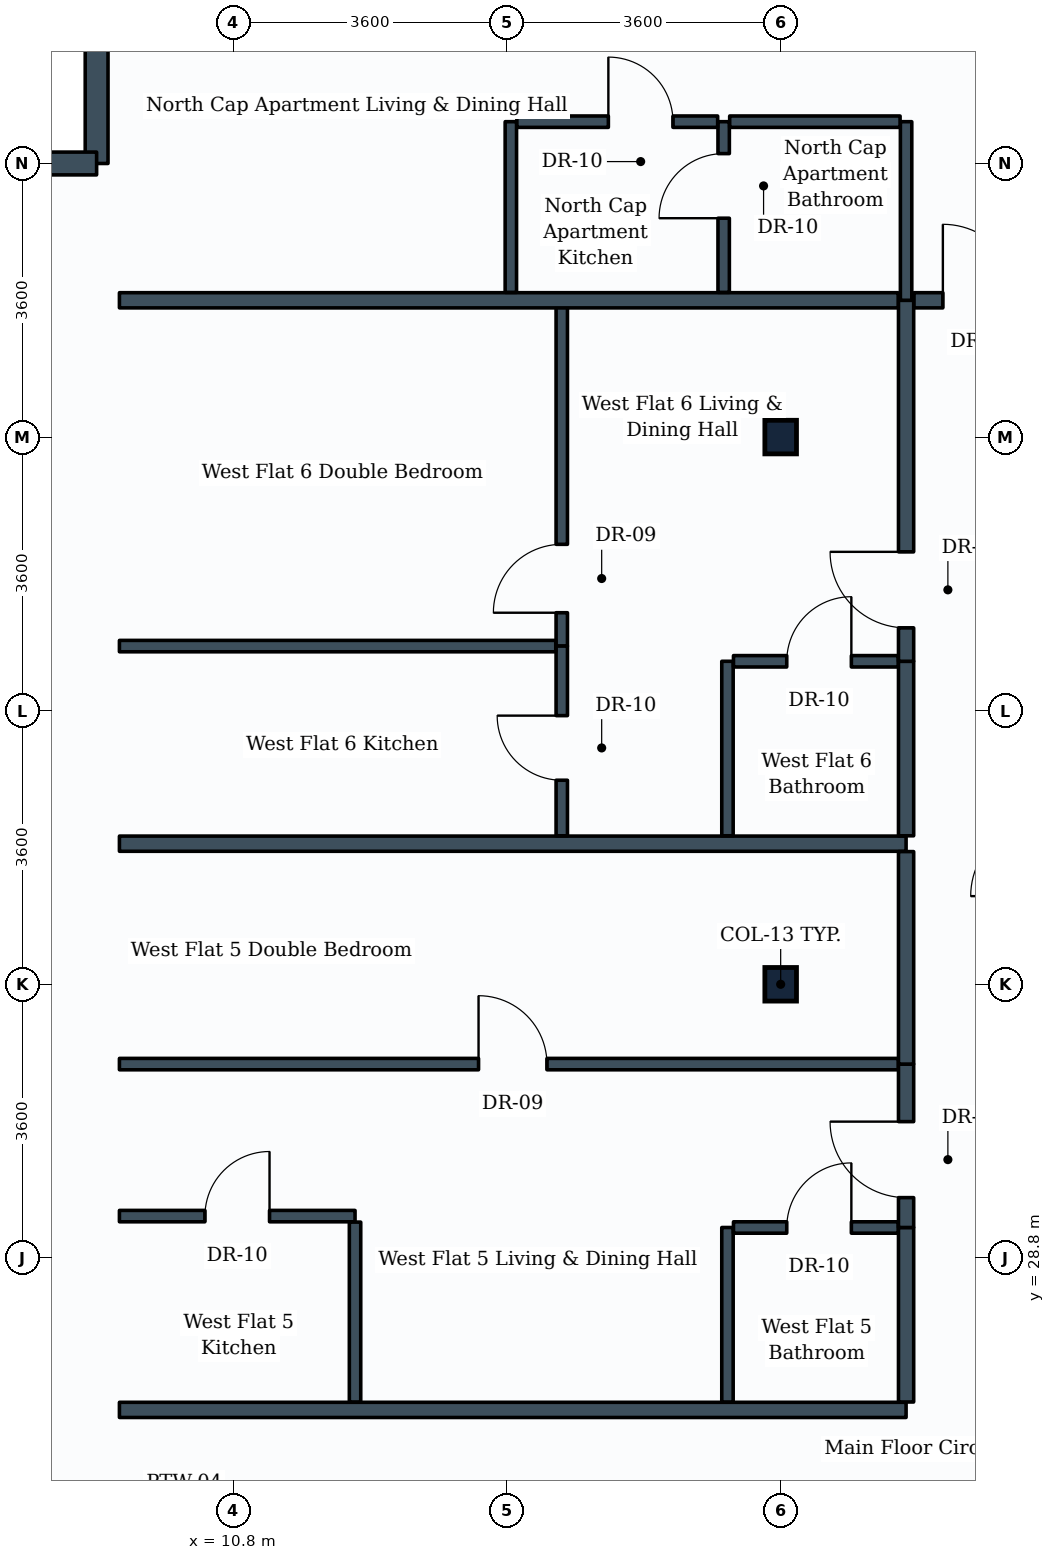
"""IFC4 building model, lengths in metres.
Left out: names, types, materials, properties, quantities, classifications, styles, units other than length and angle.
Written with IfcOpenShell. Run it as: python <this file> out.ifc"""

import sys

from ifc_helpers import new_model, si_unit, direction, frame, frame_2d, origin, origin_2d, place, context, subcontext, project, spatial, rectangle, i_section, extrude, element, fill, save


model = new_model("IFC4")
c1 = context("Model", 3, precision=1e-05, world=origin(), true_north=direction((0.0, 1.0)))
c2 = subcontext(c1, "Body", "Model", "MODEL_VIEW")
j1 = project(units=[si_unit("LENGTHUNIT", "METRE"), si_unit("PLANEANGLEUNIT", "RADIAN")], contexts=[c1])
p1 = place(None, origin())
s1 = spatial("IfcSite", under=j1, at=p1, CompositionType="ELEMENT")
p2 = place(p1, origin())
s2 = spatial("IfcBuilding", under=s1, at=p2, CompositionType="ELEMENT")
p3 = place(p2, frame((0.0, 0.0, 123.8)))
s3 = spatial("IfcBuildingStorey", under=s2, at=p3, CompositionType="ELEMENT", Elevation=123.8)
for number, where, z_axis, x_axis in (
    (1, (18.0, 32.4, 0.0), (0.0, 0.0, 1.0), (1.0, 0.0, 0.0)),
    (2, (18.0, 39.6, 0.0), (0.0, 0.0, 1.0), (1.0, 0.0, 0.0)),
):
    element("IfcColumn", number, at=place(p3, frame(where, z_axis=z_axis, x_axis=x_axis)), inside=s3, PredefinedType="COLUMN", context=c2, shape_type="SweptSolid", body=[
        extrude(i_section(OverallWidth=0.416, OverallDepth=0.442, WebThickness=0.025, FlangeThickness=0.041, FilletRadius=0.015, at=origin_2d()), origin(), (0.0, 0.0, 1.0), 3.8),
    ])
for number, where, z_axis, x_axis in (
    (3, (9.0, 43.2, 0.0), (0.0, 0.0, 1.0), (0.0, 1.0, 0.0)),
    (4, (7.2, 43.2, 0.0), (0.0, 0.0, 1.0), (1.0, 0.0, 0.0)),
):
    element("IfcWall", number, at=place(p3, frame(where, z_axis=z_axis, x_axis=x_axis)), inside=s3, PredefinedType="STANDARD", context=c2, shape_type="SweptSolid", body=[
        extrude(rectangle(XDim=1.8, YDim=0.3, at=frame_2d((0.9, 0.0))), origin(), (0.0, 0.0, 1.0), 2.43),
    ])
for number, where, z_axis, x_axis in (
    (5, (9.3, 26.8, 0.0), (0.0, 0.0, 1.0), (1.0, 0.0, 0.0)),
    (6, (9.3, 34.25, 0.0), (0.0, 0.0, 1.0), (1.0, 0.0, 0.0)),
):
    element("IfcWall", number, at=place(p3, frame(where, z_axis=z_axis, x_axis=x_axis)), inside=s3, PredefinedType="PARTITIONING", context=c2, shape_type="SweptSolid", body=[
        extrude(rectangle(XDim=10.35, YDim=0.2, at=frame_2d((5.175, 0.0))), origin(), (0.0, 0.0, 1.0), 2.43),
    ])
p4 = place(p3, frame((19.65, 26.904, 0.0), z_axis=(0.0, 0.0, 1.0), x_axis=(0.0, 1.0, 0.0)))
e7 = element("IfcWall", 7, at=p4, inside=s3, PredefinedType="PARTITIONING", context=c2, shape_type="SweptSolid", body=[
    extrude(rectangle(XDim=2.296, YDim=0.2, at=frame_2d((1.148, 0.0))), origin(), (0.0, 0.0, 1.0), 3.15),
])
p5 = place(p3, frame((17.3, 26.904, 0.0), z_axis=(0.0, 0.0, 1.0), x_axis=(0.0, 1.0, 0.0)))
e8 = element("IfcWall", 8, at=p5, inside=s3, PredefinedType="PARTITIONING", context=c2, shape_type="SweptSolid", body=[
    extrude(rectangle(XDim=2.296, YDim=0.15, at=frame_2d((1.148, 0.0))), origin(), (0.0, 0.0, 1.0), 3.15),
])
p6 = place(p3, frame((17.379, 29.2, 0.0), z_axis=(0.0, 0.0, 1.0), x_axis=(1.0, 0.0, 0.0)))
e9 = element("IfcWall", 9, at=p6, inside=s3, PredefinedType="PARTITIONING", context=c2, shape_type="SweptSolid", body=[
    extrude(rectangle(XDim=2.167, YDim=0.15, at=frame_2d((1.083, 0.0))), origin(), (0.0, 0.0, 1.0), 2.43),
])
p7 = place(p6, frame((0.701, 0.0, 0.0)))
e10 = element("IfcOpeningElement", 10, at=p7, cuts=e9, PredefinedType="OPENING", context=c2, shape_type="SweptSolid", body=[
    extrude(rectangle(XDim=0.85, YDim=2.1, at=frame_2d((0.425, 1.05))), frame((0.0, 0.085, 0.0), z_axis=(0.0, -1.0, 0.0), x_axis=(1.0, 0.0, 0.0)), (0.0, 0.0, 1.0), 0.17),
])
p8 = place(p3, frame((19.65, 29.2, 0.0), z_axis=(0.0, 0.0, 1.0), x_axis=(0.0, 1.0, 0.0)))
e11 = element("IfcWall", 11, at=p8, inside=s3, PredefinedType="PARTITIONING", context=c2, shape_type="SweptSolid", body=[
    extrude(rectangle(XDim=2.15, YDim=0.2, at=frame_2d((1.075, 0.0))), origin(), (0.0, 0.0, 1.0), 3.465),
])
p9 = place(p8, frame((0.393, 0.0, 0.0)))
e12 = element("IfcOpeningElement", 12, at=p9, cuts=e11, PredefinedType="OPENING", context=c2, shape_type="SweptSolid", body=[
    extrude(rectangle(XDim=1.0, YDim=2.1, at=frame_2d((0.5, 1.05))), frame((0.0, 0.11, 0.0), z_axis=(0.0, -1.0, 0.0), x_axis=(1.0, 0.0, 0.0)), (0.0, 0.0, 1.0), 0.22),
])
p10 = place(p3, frame((19.65, 31.35, 0.0), z_axis=(0.0, 0.0, 1.0), x_axis=(0.0, 1.0, 0.0)))
e13 = element("IfcWall", 13, at=p10, inside=s3, PredefinedType="PARTITIONING", context=c2, shape_type="SweptSolid", body=[
    extrude(rectangle(XDim=2.796, YDim=0.2, at=frame_2d((1.398, 0.0))), origin(), (0.0, 0.0, 1.0), 3.1),
])
p11 = place(p3, frame((9.3, 31.35, 0.0), z_axis=(0.0, 0.0, 1.0), x_axis=(1.0, 0.0, 0.0)))
e14 = element("IfcWall", 14, at=p11, inside=s3, PredefinedType="PARTITIONING", context=c2, shape_type="SweptSolid", body=[
    extrude(rectangle(XDim=10.246, YDim=0.15, at=frame_2d((5.123, 0.0))), origin(), (0.0, 0.0, 1.0), 2.43),
])
p12 = place(p11, frame((4.725, 0.0, 0.0)))
e15 = element("IfcOpeningElement", 15, at=p12, cuts=e14, PredefinedType="OPENING", context=c2, shape_type="SweptSolid", body=[
    extrude(rectangle(XDim=0.9, YDim=2.1, at=frame_2d((0.45, 1.05))), frame((0.0, 0.085, 0.0), z_axis=(0.0, -1.0, 0.0), x_axis=(1.0, 0.0, 0.0)), (0.0, 0.0, 1.0), 0.17),
])
p13 = place(p3, frame((9.3, 29.35, 0.0), z_axis=(0.0, 0.0, 1.0), x_axis=(1.0, 0.0, 0.0)))
e16 = element("IfcWall", 16, at=p13, inside=s3, PredefinedType="PARTITIONING", context=c2, shape_type="SweptSolid", body=[
    extrude(rectangle(XDim=3.1, YDim=0.15, at=frame_2d((1.55, 0.0))), origin(), (0.0, 0.0, 1.0), 3.01),
])
p14 = place(p13, frame((1.125, 0.0, 0.0)))
e17 = element("IfcOpeningElement", 17, at=p14, cuts=e16, PredefinedType="OPENING", context=c2, shape_type="SweptSolid", body=[
    extrude(rectangle(XDim=0.85, YDim=2.1, at=frame_2d((0.425, 1.05))), frame((0.0, 0.085, 0.0), z_axis=(0.0, -1.0, 0.0), x_axis=(1.0, 0.0, 0.0)), (0.0, 0.0, 1.0), 0.17),
])
p15 = place(p3, frame((12.4, 26.904, 0.0), z_axis=(0.0, 0.0, 1.0), x_axis=(0.0, 1.0, 0.0)))
e18 = element("IfcWall", 18, at=p15, inside=s3, PredefinedType="PARTITIONING", context=c2, shape_type="SweptSolid", body=[
    extrude(rectangle(XDim=2.367, YDim=0.15, at=frame_2d((1.184, 0.0))), origin(), (0.0, 0.0, 1.0), 3.15),
])
p16 = place(p3, frame((19.65, 34.354, 0.0), z_axis=(0.0, 0.0, 1.0), x_axis=(0.0, 1.0, 0.0)))
e19 = element("IfcWall", 19, at=p16, inside=s3, PredefinedType="PARTITIONING", context=c2, shape_type="SweptSolid", body=[
    extrude(rectangle(XDim=2.296, YDim=0.2, at=frame_2d((1.148, 0.0))), origin(), (0.0, 0.0, 1.0), 3.15),
])
p17 = place(p3, frame((17.3, 34.354, 0.0), z_axis=(0.0, 0.0, 1.0), x_axis=(0.0, 1.0, 0.0)))
e20 = element("IfcWall", 20, at=p17, inside=s3, PredefinedType="PARTITIONING", context=c2, shape_type="SweptSolid", body=[
    extrude(rectangle(XDim=2.296, YDim=0.15, at=frame_2d((1.148, 0.0))), origin(), (0.0, 0.0, 1.0), 3.15),
])
p18 = place(p3, frame((17.379, 36.65, 0.0), z_axis=(0.0, 0.0, 1.0), x_axis=(1.0, 0.0, 0.0)))
e21 = element("IfcWall", 21, at=p18, inside=s3, PredefinedType="PARTITIONING", context=c2, shape_type="SweptSolid", body=[
    extrude(rectangle(XDim=2.167, YDim=0.15, at=frame_2d((1.083, 0.0))), origin(), (0.0, 0.0, 1.0), 2.43),
])
p19 = place(p18, frame((0.701, 0.0, 0.0)))
e22 = element("IfcOpeningElement", 22, at=p19, cuts=e21, PredefinedType="OPENING", context=c2, shape_type="SweptSolid", body=[
    extrude(rectangle(XDim=0.85, YDim=2.1, at=frame_2d((0.425, 1.05))), frame((0.0, 0.085, 0.0), z_axis=(0.0, -1.0, 0.0), x_axis=(1.0, 0.0, 0.0)), (0.0, 0.0, 1.0), 0.17),
])
p20 = place(p3, frame((19.65, 36.65, 0.0), z_axis=(0.0, 0.0, 1.0), x_axis=(0.0, 1.0, 0.0)))
e23 = element("IfcWall", 23, at=p20, inside=s3, PredefinedType="PARTITIONING", context=c2, shape_type="SweptSolid", body=[
    extrude(rectangle(XDim=4.75, YDim=0.2, at=frame_2d((2.375, 0.0))), origin(), (0.0, 0.0, 1.0), 3.465),
])
p21 = place(p20, frame((0.44, 0.0, 0.0)))
e24 = element("IfcOpeningElement", 24, at=p21, cuts=e23, PredefinedType="OPENING", context=c2, shape_type="SweptSolid", body=[
    extrude(rectangle(XDim=1.0, YDim=2.1, at=frame_2d((0.5, 1.05))), frame((0.0, 0.11, 0.0), z_axis=(0.0, -1.0, 0.0), x_axis=(1.0, 0.0, 0.0)), (0.0, 0.0, 1.0), 0.22),
])
p22 = place(p3, frame((15.12, 36.85, 0.0), z_axis=(0.0, 0.0, 1.0), x_axis=(0.0, 1.0, 0.0)))
e25 = element("IfcWall", 25, at=p22, inside=s3, PredefinedType="PARTITIONING", context=c2, shape_type="SweptSolid", body=[
    extrude(rectangle(XDim=4.55, YDim=0.15, at=frame_2d((2.275, 0.0))), origin(), (0.0, 0.0, 1.0), 3.465),
])
p23 = place(p22, frame((0.439, 0.0, 0.0)))
e26 = element("IfcOpeningElement", 26, at=p23, cuts=e25, PredefinedType="OPENING", context=c2, shape_type="SweptSolid", body=[
    extrude(rectangle(XDim=0.9, YDim=2.1, at=frame_2d((0.45, 1.05))), frame((0.0, 0.085, 0.0), z_axis=(0.0, -1.0, 0.0), x_axis=(1.0, 0.0, 0.0)), (0.0, 0.0, 1.0), 0.17),
])
p24 = place(p3, frame((15.12, 34.354, 0.0), z_axis=(0.0, 0.0, 1.0), x_axis=(0.0, 1.0, 0.0)))
e27 = element("IfcWall", 27, at=p24, inside=s3, PredefinedType="PARTITIONING", context=c2, shape_type="SweptSolid", body=[
    extrude(rectangle(XDim=2.496, YDim=0.15, at=frame_2d((1.248, 0.0))), origin(), (0.0, 0.0, 1.0), 3.15),
])
p25 = place(p24, frame((0.731, 0.0, 0.0)))
e28 = element("IfcOpeningElement", 28, at=p25, cuts=e27, PredefinedType="OPENING", context=c2, shape_type="SweptSolid", body=[
    extrude(rectangle(XDim=0.85, YDim=2.1, at=frame_2d((0.425, 1.05))), frame((0.0, 0.085, 0.0), z_axis=(0.0, -1.0, 0.0), x_axis=(1.0, 0.0, 0.0)), (0.0, 0.0, 1.0), 0.17),
])
p26 = place(p3, frame((9.3, 36.85, 0.0), z_axis=(0.0, 0.0, 1.0), x_axis=(1.0, 0.0, 0.0)))
e29 = element("IfcWall", 29, at=p26, inside=s3, PredefinedType="PARTITIONING", context=c2, shape_type="SweptSolid", body=[
    extrude(rectangle(XDim=5.741, YDim=0.15, at=frame_2d((2.871, 0.0))), origin(), (0.0, 0.0, 1.0), 3.465),
])
p27 = place(p3, frame((9.3, 41.4, 0.0), z_axis=(0.0, 0.0, 1.0), x_axis=(1.0, 0.0, 0.0)))
e30 = element("IfcWall", 30, at=p27, inside=s3, PredefinedType="PARTITIONING", context=c2, shape_type="SweptSolid", body=[
    extrude(rectangle(XDim=10.246, YDim=0.2, at=frame_2d((5.123, 0.0))), origin(), (0.0, 0.0, 1.0), 2.43),
])
p28 = place(p3, frame((19.754, 41.4, 0.0), z_axis=(0.0, 0.0, 1.0), x_axis=(1.0, 0.0, 0.0)))
e31 = element("IfcWall", 31, at=p28, inside=s3, PredefinedType="PARTITIONING", context=c2, shape_type="SweptSolid", body=[
    extrude(rectangle(XDim=1.667, YDim=0.2, at=frame_2d((0.833, 0.0))), origin(), (0.0, 0.0, 1.0), 3.465),
])
p29 = place(p28, frame((0.38, 0.0, 0.0)))
e32 = element("IfcOpeningElement", 32, at=p29, cuts=e31, PredefinedType="OPENING", context=c2, shape_type="SweptSolid", body=[
    extrude(rectangle(XDim=1.0, YDim=2.1, at=frame_2d((0.5, 1.05))), frame((0.0, 0.11, 0.0), z_axis=(0.0, -1.0, 0.0), x_axis=(1.0, 0.0, 0.0)), (0.0, 0.0, 1.0), 0.22),
])
p30 = place(p3, frame((19.65, 41.4, 0.0), z_axis=(0.0, 0.0, 1.0), x_axis=(0.0, 1.0, 0.0)))
e33 = element("IfcWall", 33, at=p30, inside=s3, PredefinedType="PARTITIONING", context=c2, shape_type="SweptSolid", body=[
    extrude(rectangle(XDim=2.35, YDim=0.15, at=frame_2d((1.175, 0.0))), origin(), (0.0, 0.0, 1.0), 2.43),
])
p31 = place(p3, frame((17.25, 41.504, 0.0), z_axis=(0.0, 0.0, 1.0), x_axis=(0.0, 1.0, 0.0)))
e34 = element("IfcWall", 34, at=p31, inside=s3, PredefinedType="PARTITIONING", context=c2, shape_type="SweptSolid", body=[
    extrude(rectangle(XDim=2.246, YDim=0.15, at=frame_2d((1.123, 0.0))), origin(), (0.0, 0.0, 1.0), 2.43),
])
p32 = place(p31, frame((0.976, 0.0, 0.0)))
e35 = element("IfcOpeningElement", 35, at=p32, cuts=e34, PredefinedType="OPENING", context=c2, shape_type="SweptSolid", body=[
    extrude(rectangle(XDim=0.85, YDim=2.1, at=frame_2d((0.425, 1.05))), frame((0.0, 0.085, 0.0), z_axis=(0.0, -1.0, 0.0), x_axis=(1.0, 0.0, 0.0)), (0.0, 0.0, 1.0), 0.17),
])
p33 = place(p3, frame((17.329, 43.75, 0.0), z_axis=(0.0, 0.0, 1.0), x_axis=(1.0, 0.0, 0.0)))
e36 = element("IfcWall", 36, at=p33, inside=s3, PredefinedType="PARTITIONING", context=c2, shape_type="SweptSolid", body=[
    extrude(rectangle(XDim=2.242, YDim=0.15, at=frame_2d((1.121, 0.0))), origin(), (0.0, 0.0, 1.0), 2.43),
])
p34 = place(p3, frame((14.45, 41.504, 0.0), z_axis=(0.0, 0.0, 1.0), x_axis=(0.0, 1.0, 0.0)))
e37 = element("IfcWall", 37, at=p34, inside=s3, PredefinedType="PARTITIONING", context=c2, shape_type="SweptSolid", body=[
    extrude(rectangle(XDim=2.246, YDim=0.15, at=frame_2d((1.123, 0.0))), origin(), (0.0, 0.0, 1.0), 2.43),
])
p35 = place(p3, frame((14.529, 43.75, 0.0), z_axis=(0.0, 0.0, 1.0), x_axis=(1.0, 0.0, 0.0)))
e38 = element("IfcWall", 38, at=p35, inside=s3, PredefinedType="PARTITIONING", context=c2, shape_type="SweptSolid", body=[
    extrude(rectangle(XDim=2.642, YDim=0.15, at=frame_2d((1.321, 0.0))), origin(), (0.0, 0.0, 1.0), 2.43),
])
p36 = place(p35, frame((1.204, 0.0, 0.0)))
e39 = element("IfcOpeningElement", 39, at=p36, cuts=e38, PredefinedType="OPENING", context=c2, shape_type="SweptSolid", body=[
    extrude(rectangle(XDim=0.85, YDim=2.1, at=frame_2d((0.425, 1.05))), frame((0.0, 0.085, 0.0), z_axis=(0.0, -1.0, 0.0), x_axis=(1.0, 0.0, 0.0)), (0.0, 0.0, 1.0), 0.17),
])
p37 = place(p7, origin())
e40 = element("IfcDoor", 40, at=p37, inside=s3, OperationType="SINGLE_SWING_RIGHT", PredefinedType="DOOR", context=c2, shape_type="SweptSolid", body=[
    extrude(rectangle(XDim=0.85, YDim=2.1, at=frame_2d((0.425, 1.05))), frame((0.0, 0.025, 0.0), z_axis=(0.0, -1.0, 0.0), x_axis=(1.0, 0.0, 0.0)), (0.0, 0.0, 1.0), 0.05),
])
fill(e10, e40)
p38 = place(p9, origin())
e41 = element("IfcDoor", 41, at=p38, inside=s3, OperationType="SINGLE_SWING_RIGHT", PredefinedType="DOOR", context=c2, shape_type="SweptSolid", body=[
    extrude(rectangle(XDim=1.0, YDim=2.1, at=frame_2d((0.5, 1.05))), frame((0.0, 0.025, 0.0), z_axis=(0.0, -1.0, 0.0), x_axis=(1.0, 0.0, 0.0)), (0.0, 0.0, 1.0), 0.05),
])
fill(e12, e41)
p39 = place(p12, origin())
e42 = element("IfcDoor", 42, at=p39, inside=s3, OperationType="SINGLE_SWING_LEFT", PredefinedType="DOOR", context=c2, shape_type="SweptSolid", body=[
    extrude(rectangle(XDim=0.9, YDim=2.1, at=frame_2d((0.45, 1.05))), frame((0.0, 0.025, 0.0), z_axis=(0.0, -1.0, 0.0), x_axis=(1.0, 0.0, 0.0)), (0.0, 0.0, 1.0), 0.05),
])
fill(e15, e42)
p40 = place(p14, origin())
e43 = element("IfcDoor", 43, at=p40, inside=s3, OperationType="SINGLE_SWING_RIGHT", PredefinedType="DOOR", context=c2, shape_type="SweptSolid", body=[
    extrude(rectangle(XDim=0.85, YDim=2.1, at=frame_2d((0.425, 1.05))), frame((0.0, 0.025, 0.0), z_axis=(0.0, -1.0, 0.0), x_axis=(1.0, 0.0, 0.0)), (0.0, 0.0, 1.0), 0.05),
])
fill(e17, e43)
p41 = place(p19, origin())
e44 = element("IfcDoor", 44, at=p41, inside=s3, OperationType="SINGLE_SWING_RIGHT", PredefinedType="DOOR", context=c2, shape_type="SweptSolid", body=[
    extrude(rectangle(XDim=0.85, YDim=2.1, at=frame_2d((0.425, 1.05))), frame((0.0, 0.025, 0.0), z_axis=(0.0, -1.0, 0.0), x_axis=(1.0, 0.0, 0.0)), (0.0, 0.0, 1.0), 0.05),
])
fill(e22, e44)
p42 = place(p21, origin())
e45 = element("IfcDoor", 45, at=p42, inside=s3, OperationType="SINGLE_SWING_RIGHT", PredefinedType="DOOR", context=c2, shape_type="SweptSolid", body=[
    extrude(rectangle(XDim=1.0, YDim=2.1, at=frame_2d((0.5, 1.05))), frame((0.0, 0.025, 0.0), z_axis=(0.0, -1.0, 0.0), x_axis=(1.0, 0.0, 0.0)), (0.0, 0.0, 1.0), 0.05),
])
fill(e24, e45)
p43 = place(p23, origin())
e46 = element("IfcDoor", 46, at=p43, inside=s3, OperationType="SINGLE_SWING_LEFT", PredefinedType="DOOR", context=c2, shape_type="SweptSolid", body=[
    extrude(rectangle(XDim=0.9, YDim=2.1, at=frame_2d((0.45, 1.05))), frame((0.0, 0.025, 0.0), z_axis=(0.0, -1.0, 0.0), x_axis=(1.0, 0.0, 0.0)), (0.0, 0.0, 1.0), 0.05),
])
fill(e26, e46)
p44 = place(p25, origin())
e47 = element("IfcDoor", 47, at=p44, inside=s3, OperationType="SINGLE_SWING_RIGHT", PredefinedType="DOOR", context=c2, shape_type="SweptSolid", body=[
    extrude(rectangle(XDim=0.85, YDim=2.1, at=frame_2d((0.425, 1.05))), frame((0.0, 0.025, 0.0), z_axis=(0.0, -1.0, 0.0), x_axis=(1.0, 0.0, 0.0)), (0.0, 0.0, 1.0), 0.05),
])
fill(e28, e47)
p45 = place(p29, origin())
e48 = element("IfcDoor", 48, at=p45, inside=s3, OperationType="SINGLE_SWING_LEFT", PredefinedType="DOOR", context=c2, shape_type="SweptSolid", body=[
    extrude(rectangle(XDim=1.0, YDim=2.1, at=frame_2d((0.5, 1.05))), frame((0.0, 0.025, 0.0), z_axis=(0.0, -1.0, 0.0), x_axis=(1.0, 0.0, 0.0)), (0.0, 0.0, 1.0), 0.05),
])
fill(e32, e48)
p46 = place(p32, origin())
e49 = element("IfcDoor", 49, at=p46, inside=s3, OperationType="SINGLE_SWING_LEFT", PredefinedType="DOOR", context=c2, shape_type="SweptSolid", body=[
    extrude(rectangle(XDim=0.85, YDim=2.1, at=frame_2d((0.425, 1.05))), frame((0.0, 0.025, 0.0), z_axis=(0.0, -1.0, 0.0), x_axis=(1.0, 0.0, 0.0)), (0.0, 0.0, 1.0), 0.05),
])
fill(e35, e49)
p47 = place(p36, origin())
e50 = element("IfcDoor", 50, at=p47, inside=s3, OperationType="SINGLE_SWING_LEFT", PredefinedType="DOOR", context=c2, shape_type="SweptSolid", body=[
    extrude(rectangle(XDim=0.85, YDim=2.1, at=frame_2d((0.425, 1.05))), frame((0.0, 0.025, 0.0), z_axis=(0.0, -1.0, 0.0), x_axis=(1.0, 0.0, 0.0)), (0.0, 0.0, 1.0), 0.05),
])
fill(e39, e50)
save(model, sys.argv[1])
